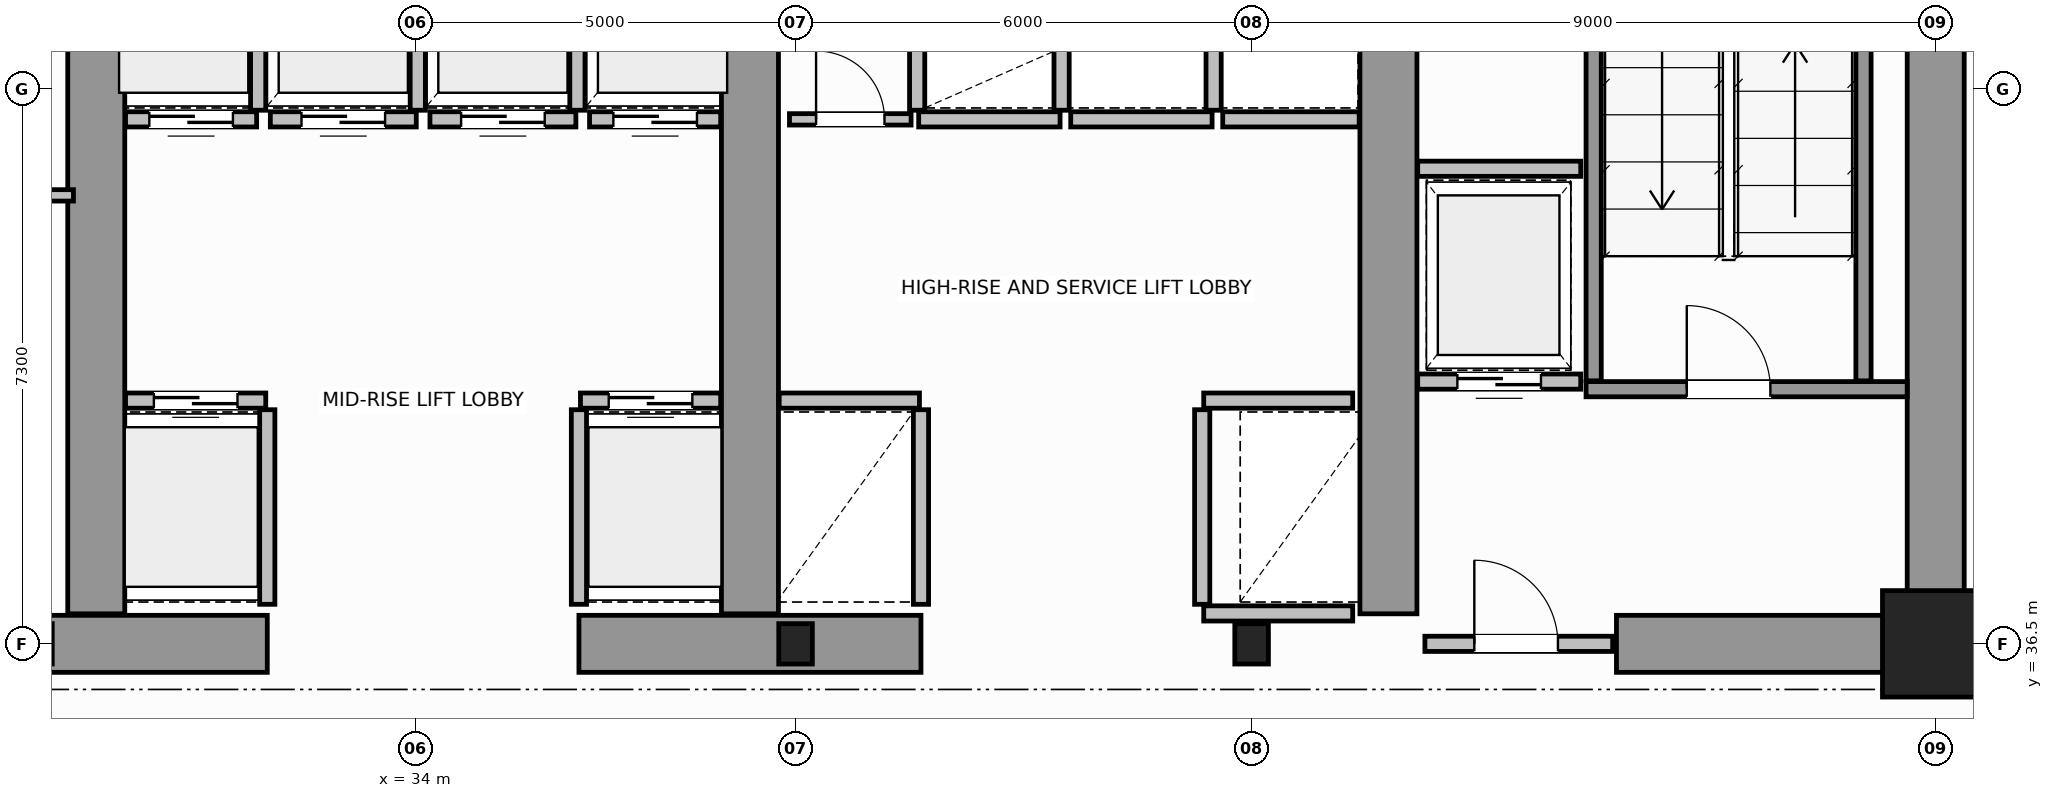
"""IFC4 building model, lengths in metres.
Left out: names, types, materials, properties, quantities, classifications, styles, units other than length and angle.
Written with IfcOpenShell. Run it as: python <this file> out.ifc"""

import sys

from ifc_helpers import new_model, si_unit, direction, frame, frame_2d, origin, origin_2d, place, context, subcontext, project, spatial, rectangle, i_section, extrude, source, transform, mapped, element, fill, save


model = new_model("IFC4")
c1 = context("Model", 3, precision=1e-05, world=origin(), true_north=direction((0.0, 1.0)))
c2 = subcontext(c1, "Body", "Model", "MODEL_VIEW")
j1 = project(units=[si_unit("LENGTHUNIT", "METRE"), si_unit("PLANEANGLEUNIT", "RADIAN")], contexts=[c1])
p1 = place(None, origin())
s1 = spatial("IfcSite", under=j1, at=p1, CompositionType="ELEMENT")
p2 = place(p1, origin())
s2 = spatial("IfcBuilding", under=s1, at=p2, CompositionType="ELEMENT")
p3 = place(p2, frame((0.0, 0.0, 111.0)))
s3 = spatial("IfcBuildingStorey", under=s2, at=p3, CompositionType="ELEMENT", Elevation=111.0)
m1 = source(origin(), c2, "Body", "SweptSolid", [
    extrude(i_section(OverallWidth=0.442, OverallDepth=0.531, WebThickness=0.065, FlangeThickness=0.076, FilletRadius=0.015, at=origin_2d()), origin(), (0.0, 0.0, 1.0), 3.8),
])
for number, where, z_axis, x_axis in (
    (1, (39.0, 36.5, 0.0), (0.0, 0.0, 1.0), (1.0, 0.0, 0.0)),
    (2, (45.0, 36.5, 0.0), (0.0, 0.0, 1.0), (1.0, 0.0, 0.0)),
):
    element("IfcColumn", number, at=place(p3, frame(where, z_axis=z_axis, x_axis=x_axis)), inside=s3, PredefinedType="COLUMN", context=c2, shape_type="MappedRepresentation", body=[
        mapped(m1, transform((0.0, 0.0, 0.0), scale=1.0)),
    ])
m2 = source(origin(), c2, "Body", "SweptSolid", [
    extrude(rectangle(XDim=1.4, YDim=1.4, at=origin_2d()), origin(), (0.0, 0.0, 1.0), 3.8),
])
p4 = place(p3, frame((54.0, 36.5, 0.0), z_axis=(0.0, 0.0, 1.0), x_axis=(1.0, 0.0, 0.0)))
e3 = element("IfcColumn", 3, at=p4, inside=s3, PredefinedType="COLUMN", context=c2, shape_type="MappedRepresentation", body=[
    mapped(m2, transform((0.0, 0.0, 0.0), scale=1.0)),
])
p5 = place(p3, frame((54.0, 36.5, 0.0), z_axis=(0.0, 0.0, 1.0), x_axis=(0.0, 1.0, 0.0)))
e4 = element("IfcWall", 4, at=p5, inside=s3, PredefinedType="SHEAR", context=c2, shape_type="SweptSolid", body=[
    extrude(rectangle(XDim=14.5, YDim=0.75, at=frame_2d((7.25, 0.0))), origin(), (0.0, 0.0, 1.0), 3.8),
])
for number, where, z_axis, x_axis in (
    (5, (27.55, 36.5, 0.0), (0.0, 0.0, 1.0), (1.0, 0.0, 0.0)),
    (6, (36.15, 36.5, 0.0), (0.0, 0.0, 1.0), (1.0, 0.0, 0.0)),
):
    element("IfcWall", number, at=place(p3, frame(where, z_axis=z_axis, x_axis=x_axis)), inside=s3, PredefinedType="SHEAR", context=c2, shape_type="SweptSolid", body=[
        extrude(rectangle(XDim=4.5, YDim=0.75, at=frame_2d((2.25, 0.0))), origin(), (0.0, 0.0, 1.0), 3.8),
    ])
p6 = place(p3, frame((49.8, 36.5, 0.0), z_axis=(0.0, 0.0, 1.0), x_axis=(1.0, 0.0, 0.0)))
e7 = element("IfcWall", 7, at=p6, inside=s3, PredefinedType="SHEAR", context=c2, shape_type="SweptSolid", body=[
    extrude(rectangle(XDim=3.805, YDim=0.75, at=frame_2d((1.902, 0.0))), origin(), (0.0, 0.0, 1.0), 2.38),
])
for number, where, z_axis, x_axis in (
    (8, (29.8, 36.895, 0.0), (0.0, 0.0, 1.0), (0.0, 1.0, 0.0)),
    (9, (38.4, 36.895, 0.0), (0.0, 0.0, 1.0), (0.0, 1.0, 0.0)),
    (10, (46.8, 36.895, 0.0), (0.0, 0.0, 1.0), (0.0, 1.0, 0.0)),
):
    element("IfcWall", number, at=place(p3, frame(where, z_axis=z_axis, x_axis=x_axis)), inside=s3, PredefinedType="SHEAR", context=c2, shape_type="SweptSolid", body=[
        extrude(rectangle(XDim=9.305, YDim=0.75, at=frame_2d((4.652, 0.0))), origin(), (0.0, 0.0, 1.0), 3.8),
    ])
p7 = place(p3, frame((49.4, 39.85, 0.0), z_axis=(0.0, 0.0, 1.0), x_axis=(1.0, 0.0, 0.0)))
e11 = element("IfcWall", 11, at=p7, inside=s3, PredefinedType="SOLIDWALL", context=c2, shape_type="SweptSolid", body=[
    extrude(rectangle(XDim=4.225, YDim=0.2, at=frame_2d((2.113, 0.0))), origin(), (0.0, 0.0, 1.0), 3.8),
])
p8 = place(p7, frame((1.325, 0.0, 0.0)))
e12 = element("IfcOpeningElement", 12, at=p8, cuts=e11, PredefinedType="OPENING", context=c2, shape_type="SweptSolid", body=[
    extrude(rectangle(XDim=1.1, YDim=2.15, at=frame_2d((0.55, 1.075))), frame((0.0, 0.11, 0.0), z_axis=(0.0, -1.0, 0.0), x_axis=(1.0, 0.0, 0.0)), (0.0, 0.0, 1.0), 0.22),
])
for number, where, z_axis, x_axis in (
    (13, (49.5, 39.96, 0.0), (0.0, 0.0, 1.0), (0.0, 1.0, 0.0)),
    (14, (53.05, 39.96, 0.0), (0.0, 0.0, 1.0), (0.0, 1.0, 0.0)),
):
    element("IfcWall", number, at=place(p3, frame(where, z_axis=z_axis, x_axis=x_axis)), inside=s3, PredefinedType="SOLIDWALL", context=c2, shape_type="SweptSolid", body=[
        extrude(rectangle(XDim=9.93, YDim=0.2, at=frame_2d((4.965, 0.0))), origin(), (0.0, 0.0, 1.0), 3.8),
    ])
p9 = place(p3, frame((47.28, 36.5, 0.0), z_axis=(0.0, 0.0, 1.0), x_axis=(1.0, 0.0, 0.0)))
e15 = element("IfcWall", 15, at=p9, inside=s3, PredefinedType="SOLIDWALL", context=c2, shape_type="SweptSolid", body=[
    extrude(rectangle(XDim=2.47, YDim=0.2, at=frame_2d((1.235, 0.0))), origin(), (0.0, 0.0, 1.0), 2.37),
])
p10 = place(p9, frame((0.65, 0.0, 0.0)))
e16 = element("IfcOpeningElement", 16, at=p10, cuts=e15, PredefinedType="OPENING", context=c2, shape_type="SweptSolid", body=[
    extrude(rectangle(XDim=1.1, YDim=2.15, at=frame_2d((0.55, 1.075))), frame((0.0, 0.11, 0.0), z_axis=(0.0, -1.0, 0.0), x_axis=(1.0, 0.0, 0.0)), (0.0, 0.0, 1.0), 0.22),
])
p11 = place(p3, frame((30.185, 39.7, 0.0), z_axis=(0.0, 0.0, 1.0), x_axis=(1.0, 0.0, 0.0)))
e17 = element("IfcWall", 17, at=p11, inside=s3, PredefinedType="SOLIDWALL", context=c2, shape_type="SweptSolid", body=[
    extrude(rectangle(XDim=1.845, YDim=0.2, at=frame_2d((0.922, 0.0))), origin(), (0.0, 0.0, 1.0), 3.58),
])
p12 = place(p11, frame((0.373, 0.0, 0.0)))
e18 = element("IfcOpeningElement", 18, at=p12, cuts=e17, PredefinedType="OPENING", context=c2, shape_type="SweptSolid", body=[
    extrude(rectangle(XDim=1.1, YDim=2.15, at=frame_2d((0.55, 1.075))), frame((0.0, 0.11, 0.0), z_axis=(0.0, -1.0, 0.0), x_axis=(1.0, 0.0, 0.0)), (0.0, 0.0, 1.0), 0.22),
])
p13 = place(p3, frame((32.05, 37.02, 0.0), z_axis=(0.0, 0.0, 1.0), x_axis=(0.0, 1.0, 0.0)))
e19 = element("IfcWall", 19, at=p13, inside=s3, PredefinedType="SOLIDWALL", context=c2, shape_type="SweptSolid", body=[
    extrude(rectangle(XDim=2.56, YDim=0.2, at=frame_2d((1.28, 0.0))), origin(), (0.0, 0.0, 1.0), 3.58),
])
p14 = place(p3, frame((36.17, 39.7, 0.0), z_axis=(0.0, 0.0, 1.0), x_axis=(1.0, 0.0, 0.0)))
e20 = element("IfcWall", 20, at=p14, inside=s3, PredefinedType="SOLIDWALL", context=c2, shape_type="SweptSolid", body=[
    extrude(rectangle(XDim=1.845, YDim=0.2, at=frame_2d((0.922, 0.0))), origin(), (0.0, 0.0, 1.0), 3.58),
])
p15 = place(p14, frame((0.372, 0.0, 0.0)))
e21 = element("IfcOpeningElement", 21, at=p15, cuts=e20, PredefinedType="OPENING", context=c2, shape_type="SweptSolid", body=[
    extrude(rectangle(XDim=1.1, YDim=2.15, at=frame_2d((0.55, 1.075))), frame((0.0, 0.11, 0.0), z_axis=(0.0, -1.0, 0.0), x_axis=(1.0, 0.0, 0.0)), (0.0, 0.0, 1.0), 0.22),
])
p16 = place(p3, frame((36.15, 37.02, 0.0), z_axis=(0.0, 0.0, 1.0), x_axis=(0.0, 1.0, 0.0)))
e22 = element("IfcWall", 22, at=p16, inside=s3, PredefinedType="SOLIDWALL", context=c2, shape_type="SweptSolid", body=[
    extrude(rectangle(XDim=2.56, YDim=0.2, at=frame_2d((1.28, 0.0))), origin(), (0.0, 0.0, 1.0), 3.58),
])
p17 = place(p3, frame((30.185, 43.4, 0.0), z_axis=(0.0, 0.0, 1.0), x_axis=(1.0, 0.0, 0.0)))
e23 = element("IfcWall", 23, at=p17, inside=s3, PredefinedType="SOLIDWALL", context=c2, shape_type="SweptSolid", body=[
    extrude(rectangle(XDim=1.725, YDim=0.2, at=frame_2d((0.862, 0.0))), origin(), (0.0, 0.0, 1.0), 3.58),
])
p18 = place(p17, frame((0.313, 0.0, 0.0)))
e24 = element("IfcOpeningElement", 24, at=p18, cuts=e23, PredefinedType="OPENING", context=c2, shape_type="SweptSolid", body=[
    extrude(rectangle(XDim=1.1, YDim=2.15, at=frame_2d((0.55, 1.075))), frame((0.0, 0.11, 0.0), z_axis=(0.0, -1.0, 0.0), x_axis=(1.0, 0.0, 0.0)), (0.0, 0.0, 1.0), 0.22),
])
p19 = place(p3, frame((31.93, 43.52, 0.0), z_axis=(0.0, 0.0, 1.0), x_axis=(0.0, 1.0, 0.0)))
e25 = element("IfcWall", 25, at=p19, inside=s3, PredefinedType="SOLIDWALL", context=c2, shape_type="SweptSolid", body=[
    extrude(rectangle(XDim=2.56, YDim=0.2, at=frame_2d((1.28, 0.0))), origin(), (0.0, 0.0, 1.0), 3.58),
])
p20 = place(p3, frame((32.09, 43.4, 0.0), z_axis=(0.0, 0.0, 1.0), x_axis=(1.0, 0.0, 0.0)))
e26 = element("IfcWall", 26, at=p20, inside=s3, PredefinedType="SOLIDWALL", context=c2, shape_type="SweptSolid", body=[
    extrude(rectangle(XDim=1.92, YDim=0.2, at=frame_2d((0.96, 0.0))), origin(), (0.0, 0.0, 1.0), 3.58),
])
p21 = place(p20, frame((0.41, 0.0, 0.0)))
e27 = element("IfcOpeningElement", 27, at=p21, cuts=e26, PredefinedType="OPENING", context=c2, shape_type="SweptSolid", body=[
    extrude(rectangle(XDim=1.1, YDim=2.15, at=frame_2d((0.55, 1.075))), frame((0.0, 0.11, 0.0), z_axis=(0.0, -1.0, 0.0), x_axis=(1.0, 0.0, 0.0)), (0.0, 0.0, 1.0), 0.22),
])
p22 = place(p3, frame((34.03, 43.52, 0.0), z_axis=(0.0, 0.0, 1.0), x_axis=(0.0, 1.0, 0.0)))
e28 = element("IfcWall", 28, at=p22, inside=s3, PredefinedType="SOLIDWALL", context=c2, shape_type="SweptSolid", body=[
    extrude(rectangle(XDim=2.56, YDim=0.2, at=frame_2d((1.28, 0.0))), origin(), (0.0, 0.0, 1.0), 3.58),
])
p23 = place(p3, frame((34.19, 43.4, 0.0), z_axis=(0.0, 0.0, 1.0), x_axis=(1.0, 0.0, 0.0)))
e29 = element("IfcWall", 29, at=p23, inside=s3, PredefinedType="SOLIDWALL", context=c2, shape_type="SweptSolid", body=[
    extrude(rectangle(XDim=1.92, YDim=0.2, at=frame_2d((0.96, 0.0))), origin(), (0.0, 0.0, 1.0), 3.58),
])
p24 = place(p23, frame((0.41, 0.0, 0.0)))
e30 = element("IfcOpeningElement", 30, at=p24, cuts=e29, PredefinedType="OPENING", context=c2, shape_type="SweptSolid", body=[
    extrude(rectangle(XDim=1.1, YDim=2.15, at=frame_2d((0.55, 1.075))), frame((0.0, 0.11, 0.0), z_axis=(0.0, -1.0, 0.0), x_axis=(1.0, 0.0, 0.0)), (0.0, 0.0, 1.0), 0.22),
])
p25 = place(p3, frame((36.13, 43.52, 0.0), z_axis=(0.0, 0.0, 1.0), x_axis=(0.0, 1.0, 0.0)))
e31 = element("IfcWall", 31, at=p25, inside=s3, PredefinedType="SOLIDWALL", context=c2, shape_type="SweptSolid", body=[
    extrude(rectangle(XDim=2.56, YDim=0.2, at=frame_2d((1.28, 0.0))), origin(), (0.0, 0.0, 1.0), 3.58),
])
p26 = place(p3, frame((36.29, 43.4, 0.0), z_axis=(0.0, 0.0, 1.0), x_axis=(1.0, 0.0, 0.0)))
e32 = element("IfcWall", 32, at=p26, inside=s3, PredefinedType="SOLIDWALL", context=c2, shape_type="SweptSolid", body=[
    extrude(rectangle(XDim=1.725, YDim=0.2, at=frame_2d((0.862, 0.0))), origin(), (0.0, 0.0, 1.0), 3.58),
])
p27 = place(p26, frame((0.313, 0.0, 0.0)))
e33 = element("IfcOpeningElement", 33, at=p27, cuts=e32, PredefinedType="OPENING", context=c2, shape_type="SweptSolid", body=[
    extrude(rectangle(XDim=1.1, YDim=2.15, at=frame_2d((0.55, 1.075))), frame((0.0, 0.11, 0.0), z_axis=(0.0, -1.0, 0.0), x_axis=(1.0, 0.0, 0.0)), (0.0, 0.0, 1.0), 0.22),
])
p28 = place(p3, frame((38.785, 39.7, 0.0), z_axis=(0.0, 0.0, 1.0), x_axis=(1.0, 0.0, 0.0)))
e34 = element("IfcWall", 34, at=p28, inside=s3, PredefinedType="SOLIDWALL", context=c2, shape_type="SweptSolid", body=[
    extrude(rectangle(XDim=1.845, YDim=0.2, at=frame_2d((0.922, 0.0))), origin(), (0.0, 0.0, 1.0), 3.58),
])
p29 = place(p3, frame((40.65, 37.02, 0.0), z_axis=(0.0, 0.0, 1.0), x_axis=(0.0, 1.0, 0.0)))
e35 = element("IfcWall", 35, at=p29, inside=s3, PredefinedType="SOLIDWALL", context=c2, shape_type="SweptSolid", body=[
    extrude(rectangle(XDim=2.56, YDim=0.2, at=frame_2d((1.28, 0.0))), origin(), (0.0, 0.0, 1.0), 3.58),
])
p30 = place(p3, frame((44.37, 39.7, 0.0), z_axis=(0.0, 0.0, 1.0), x_axis=(1.0, 0.0, 0.0)))
e36 = element("IfcWall", 36, at=p30, inside=s3, PredefinedType="SOLIDWALL", context=c2, shape_type="SweptSolid", body=[
    extrude(rectangle(XDim=1.96, YDim=0.2, at=frame_2d((0.98, 0.0))), origin(), (0.0, 0.0, 1.0), 3.58),
])
p31 = place(p3, frame((44.37, 36.9, 0.0), z_axis=(0.0, 0.0, 1.0), x_axis=(1.0, 0.0, 0.0)))
e37 = element("IfcWall", 37, at=p31, inside=s3, PredefinedType="SOLIDWALL", context=c2, shape_type="SweptSolid", body=[
    extrude(rectangle(XDim=1.96, YDim=0.2, at=frame_2d((0.98, 0.0))), origin(), (0.0, 0.0, 1.0), 2.37),
])
p32 = place(p3, frame((44.35, 37.02, 0.0), z_axis=(0.0, 0.0, 1.0), x_axis=(0.0, 1.0, 0.0)))
e38 = element("IfcWall", 38, at=p32, inside=s3, PredefinedType="SOLIDWALL", context=c2, shape_type="SweptSolid", body=[
    extrude(rectangle(XDim=2.56, YDim=0.2, at=frame_2d((1.28, 0.0))), origin(), (0.0, 0.0, 1.0), 3.58),
])
p33 = place(p3, frame((40.62, 43.4, 0.0), z_axis=(0.0, 0.0, 1.0), x_axis=(1.0, 0.0, 0.0)))
e39 = element("IfcWall", 39, at=p33, inside=s3, PredefinedType="SOLIDWALL", context=c2, shape_type="SweptSolid", body=[
    extrude(rectangle(XDim=1.86, YDim=0.2, at=frame_2d((0.93, 0.0))), origin(), (0.0, 0.0, 1.0), 3.58),
])
for number, where, z_axis, x_axis in (
    (40, (40.6, 43.52, 0.0), (0.0, 0.0, 1.0), (0.0, 1.0, 0.0)),
    (41, (42.5, 43.52, 0.0), (0.0, 0.0, 1.0), (0.0, 1.0, 0.0)),
):
    element("IfcWall", number, at=place(p3, frame(where, z_axis=z_axis, x_axis=x_axis)), inside=s3, PredefinedType="SOLIDWALL", context=c2, shape_type="SweptSolid", body=[
        extrude(rectangle(XDim=2.56, YDim=0.2, at=frame_2d((1.28, 0.0))), origin(), (0.0, 0.0, 1.0), 3.58),
    ])
p34 = place(p3, frame((42.62, 43.4, 0.0), z_axis=(0.0, 0.0, 1.0), x_axis=(1.0, 0.0, 0.0)))
e42 = element("IfcWall", 42, at=p34, inside=s3, PredefinedType="SOLIDWALL", context=c2, shape_type="SweptSolid", body=[
    extrude(rectangle(XDim=1.86, YDim=0.2, at=frame_2d((0.93, 0.0))), origin(), (0.0, 0.0, 1.0), 3.58),
])
p35 = place(p3, frame((44.5, 43.52, 0.0), z_axis=(0.0, 0.0, 1.0), x_axis=(0.0, 1.0, 0.0)))
e43 = element("IfcWall", 43, at=p35, inside=s3, PredefinedType="SOLIDWALL", context=c2, shape_type="SweptSolid", body=[
    extrude(rectangle(XDim=2.56, YDim=0.2, at=frame_2d((1.28, 0.0))), origin(), (0.0, 0.0, 1.0), 3.58),
])
p36 = place(p3, frame((44.62, 43.4, 0.0), z_axis=(0.0, 0.0, 1.0), x_axis=(1.0, 0.0, 0.0)))
e44 = element("IfcWall", 44, at=p36, inside=s3, PredefinedType="SOLIDWALL", context=c2, shape_type="SweptSolid", body=[
    extrude(rectangle(XDim=1.795, YDim=0.2, at=frame_2d((0.897, 0.0))), origin(), (0.0, 0.0, 1.0), 3.58),
])
p37 = place(p3, frame((47.185, 39.95, 0.0), z_axis=(0.0, 0.0, 1.0), x_axis=(1.0, 0.0, 0.0)))
e45 = element("IfcWall", 45, at=p37, inside=s3, PredefinedType="SOLIDWALL", context=c2, shape_type="SweptSolid", body=[
    extrude(rectangle(XDim=2.145, YDim=0.2, at=frame_2d((1.073, 0.0))), origin(), (0.0, 0.0, 1.0), 3.58),
])
p38 = place(p37, frame((0.522, 0.0, 0.0)))
e46 = element("IfcOpeningElement", 46, at=p38, cuts=e45, PredefinedType="OPENING", context=c2, shape_type="SweptSolid", body=[
    extrude(rectangle(XDim=1.1, YDim=2.15, at=frame_2d((0.55, 1.075))), frame((0.0, 0.11, 0.0), z_axis=(0.0, -1.0, 0.0), x_axis=(1.0, 0.0, 0.0)), (0.0, 0.0, 1.0), 0.22),
])
p39 = place(p3, frame((47.185, 42.75, 0.0), z_axis=(0.0, 0.0, 1.0), x_axis=(1.0, 0.0, 0.0)))
e47 = element("IfcWall", 47, at=p39, inside=s3, PredefinedType="SOLIDWALL", context=c2, shape_type="SweptSolid", body=[
    extrude(rectangle(XDim=2.145, YDim=0.2, at=frame_2d((1.073, 0.0))), origin(), (0.0, 0.0, 1.0), 3.58),
])
p40 = place(p3, frame((21.5, 42.4, 0.0), z_axis=(0.0, 0.0, 1.0), x_axis=(1.0, 0.0, 0.0)))
e48 = element("IfcWall", 48, at=p40, inside=s3, PredefinedType="PARTITIONING", context=c2, shape_type="SweptSolid", body=[
    extrude(rectangle(XDim=8.0, YDim=0.15, at=frame_2d((4.0, 0.0))), origin(), (0.0, 0.0, 1.0), 3.58),
])
p41 = place(p40, frame((3.4, 0.0, 0.0)))
e49 = element("IfcOpeningElement", 49, at=p41, cuts=e48, PredefinedType="OPENING", context=c2, shape_type="SweptSolid", body=[
    extrude(rectangle(XDim=0.9, YDim=2.1, at=frame_2d((0.45, 1.05))), frame((0.0, 0.085, 0.0), z_axis=(0.0, -1.0, 0.0), x_axis=(1.0, 0.0, 0.0)), (0.0, 0.0, 1.0), 0.17),
])
p42 = place(p3, frame((38.92, 43.4, 0.0), z_axis=(0.0, 0.0, 1.0), x_axis=(1.0, 0.0, 0.0)))
e50 = element("IfcWall", 50, at=p42, inside=s3, PredefinedType="PARTITIONING", context=c2, shape_type="SweptSolid", body=[
    extrude(rectangle(XDim=1.6, YDim=0.15, at=frame_2d((0.8, 0.0))), origin(), (0.0, 0.0, 1.0), 3.58),
])
p43 = place(p42, frame((0.35, 0.0, 0.0)))
e51 = element("IfcOpeningElement", 51, at=p43, cuts=e50, PredefinedType="OPENING", context=c2, shape_type="SweptSolid", body=[
    extrude(rectangle(XDim=0.9, YDim=2.1, at=frame_2d((0.45, 1.05))), frame((0.0, 0.085, 0.0), z_axis=(0.0, -1.0, 0.0), x_axis=(1.0, 0.0, 0.0)), (0.0, 0.0, 1.0), 0.17),
])
p44 = place(p3, frame((54.06, 36.48, 0.0), z_axis=(0.0, 0.0, 1.0), x_axis=(1.0, 0.0, 0.0)))
e52 = element("IfcWall", 52, at=p44, inside=s3, PredefinedType="PARTITIONING", context=c2, shape_type="SweptSolid", body=[
    extrude(rectangle(XDim=6.668, YDim=0.12, at=frame_2d((3.334, 0.0))), origin(), (0.0, 0.0, 1.0), 2.87),
])
p45 = place(p44, frame((2.884, 0.0, 0.0)))
e53 = element("IfcOpeningElement", 53, at=p45, cuts=e52, PredefinedType="OPENING", context=c2, shape_type="SweptSolid", body=[
    extrude(rectangle(XDim=0.9, YDim=2.15, at=frame_2d((0.45, 1.075))), frame((0.0, 0.07, 0.0), z_axis=(0.0, -1.0, 0.0), x_axis=(1.0, 0.0, 0.0)), (0.0, 0.0, 1.0), 0.14),
])
m3 = source(origin(), c2, "Body", "SweptSolid", [
    extrude(rectangle(XDim=1.1, YDim=2.15, at=frame_2d((0.55, 1.075))), frame((0.0, 0.025, 0.0), z_axis=(0.0, -1.0, 0.0), x_axis=(1.0, 0.0, 0.0)), (0.0, 0.0, 1.0), 0.05),
])
p46 = place(p8, origin())
e54 = element("IfcDoor", 54, at=p46, inside=s3, OperationType="SINGLE_SWING_RIGHT", PredefinedType="DOOR", context=c2, shape_type="MappedRepresentation", body=[
    mapped(m3, transform((0.0, 0.0, 0.0), scale=1.0)),
])
fill(e12, e54)
p47 = place(p10, origin())
e55 = element("IfcDoor", 55, at=p47, inside=s3, OperationType="SINGLE_SWING_LEFT", PredefinedType="DOOR", context=c2, shape_type="MappedRepresentation", body=[
    mapped(m3, transform((0.0, 0.0, 0.0), scale=1.0)),
])
fill(e16, e55)
p48 = place(p12, origin())
e56 = element("IfcDoor", 56, at=p48, inside=s3, OperationType="DOUBLE_DOOR_SLIDING", PredefinedType="DOOR", context=c2, shape_type="MappedRepresentation", body=[
    mapped(m3, transform((0.0, 0.0, 0.0), scale=1.0)),
])
fill(e18, e56)
p49 = place(p15, origin())
e57 = element("IfcDoor", 57, at=p49, inside=s3, OperationType="DOUBLE_DOOR_SLIDING", PredefinedType="DOOR", context=c2, shape_type="MappedRepresentation", body=[
    mapped(m3, transform((0.0, 0.0, 0.0), scale=1.0)),
])
fill(e21, e57)
p50 = place(p18, origin())
e58 = element("IfcDoor", 58, at=p50, inside=s3, OperationType="DOUBLE_DOOR_SLIDING", PredefinedType="DOOR", context=c2, shape_type="MappedRepresentation", body=[
    mapped(m3, transform((0.0, 0.0, 0.0), scale=1.0)),
])
fill(e24, e58)
p51 = place(p21, origin())
e59 = element("IfcDoor", 59, at=p51, inside=s3, OperationType="DOUBLE_DOOR_SLIDING", PredefinedType="DOOR", context=c2, shape_type="MappedRepresentation", body=[
    mapped(m3, transform((0.0, 0.0, 0.0), scale=1.0)),
])
fill(e27, e59)
p52 = place(p24, origin())
e60 = element("IfcDoor", 60, at=p52, inside=s3, OperationType="DOUBLE_DOOR_SLIDING", PredefinedType="DOOR", context=c2, shape_type="MappedRepresentation", body=[
    mapped(m3, transform((0.0, 0.0, 0.0), scale=1.0)),
])
fill(e30, e60)
p53 = place(p27, origin())
e61 = element("IfcDoor", 61, at=p53, inside=s3, OperationType="DOUBLE_DOOR_SLIDING", PredefinedType="DOOR", context=c2, shape_type="MappedRepresentation", body=[
    mapped(m3, transform((0.0, 0.0, 0.0), scale=1.0)),
])
fill(e33, e61)
p54 = place(p38, origin())
e62 = element("IfcDoor", 62, at=p54, inside=s3, OperationType="DOUBLE_DOOR_SLIDING", PredefinedType="DOOR", context=c2, shape_type="MappedRepresentation", body=[
    mapped(m3, transform((0.0, 0.0, 0.0), scale=1.0)),
])
fill(e46, e62)
m4 = source(origin(), c2, "Body", "SweptSolid", [
    extrude(rectangle(XDim=0.9, YDim=2.1, at=frame_2d((0.45, 1.05))), frame((0.0, 0.025, 0.0), z_axis=(0.0, -1.0, 0.0), x_axis=(1.0, 0.0, 0.0)), (0.0, 0.0, 1.0), 0.05),
])
p55 = place(p43, origin())
e63 = element("IfcDoor", 63, at=p55, inside=s3, OperationType="SINGLE_SWING_LEFT", PredefinedType="DOOR", context=c2, shape_type="MappedRepresentation", body=[
    mapped(m4, transform((0.0, 0.0, 0.0), scale=1.0)),
])
fill(e51, e63)
save(model, sys.argv[1])
